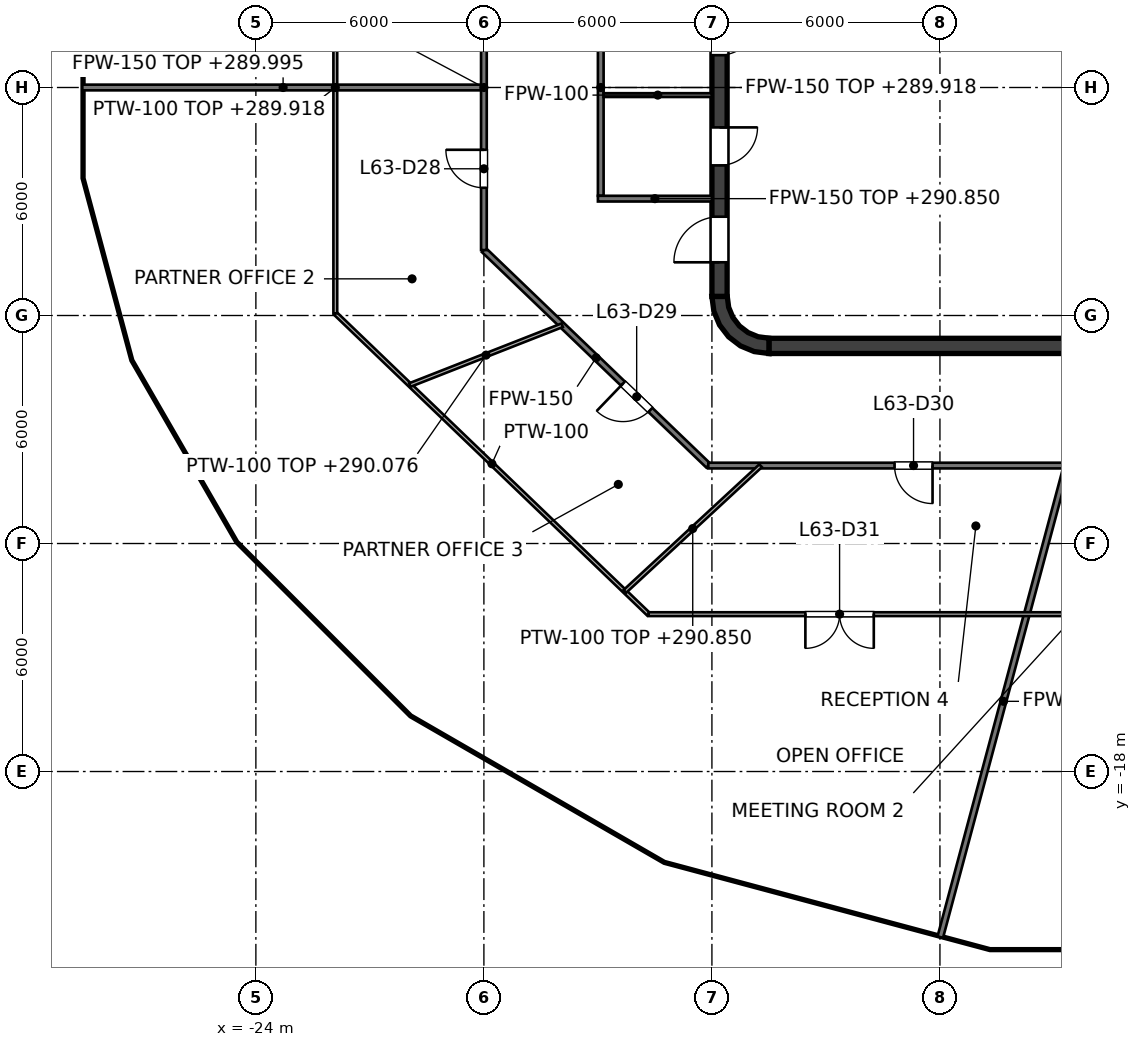
"""IFC4 building model, lengths in metres.
Left out: names, types, materials, properties, quantities, classifications, styles, units other than length and angle.
Written with IfcOpenShell. Run it as: python <this file> out.ifc"""

import sys

from ifc_helpers import new_model, si_unit, direction, frame, frame_2d, origin, place, context, subcontext, project, spatial, polyline, rectangle, outline, extrude, element, fill, save


model = new_model("IFC4")
c1 = context("Model", 3, precision=1e-05, world=origin(), true_north=direction((0.0, 1.0)))
c2 = subcontext(c1, "Body", "Model", "MODEL_VIEW")
j1 = project(units=[si_unit("LENGTHUNIT", "METRE"), si_unit("PLANEANGLEUNIT", "RADIAN")], contexts=[c1])
p1 = place(None, origin())
s1 = spatial("IfcSite", under=j1, at=p1, CompositionType="ELEMENT")
p2 = place(p1, origin())
s2 = spatial("IfcBuilding", under=s1, at=p2, CompositionType="ELEMENT")
p3 = place(p2, frame((0.0, 0.0, 287.0)))
s3 = spatial("IfcBuildingStorey", under=s2, at=p3, CompositionType="ELEMENT", Elevation=287.0)
p4 = place(p3, frame((-10.5, -6.8, 0.0), z_axis=(0.0, 0.0, 1.0), x_axis=(1.0, 0.0, 0.0)))
e1 = element("IfcWall", 1, at=p4, inside=s3, PredefinedType="SHEAR", context=c2, shape_type="SweptSolid", body=[
    extrude(rectangle(XDim=21.0, YDim=0.4, at=frame_2d((10.5, 0.0))), origin(), (0.0, 0.0, 1.0), 4.0),
])
p5 = place(p3, frame((-11.8, -5.5, 0.0), z_axis=(0.0, 0.0, 1.0), x_axis=(0.0, 1.0, 0.0)))
e2 = element("IfcWall", 2, at=p5, inside=s3, PredefinedType="SHEAR", context=c2, shape_type="SweptSolid", body=[
    extrude(rectangle(XDim=11.0, YDim=0.4, at=frame_2d((5.5, 0.0))), origin(), (0.0, 0.0, 1.0), 4.0),
])
p6 = place(p5, frame((3.45, 0.0, 0.0)))
e3 = element("IfcOpeningElement", 3, at=p6, cuts=e2, PredefinedType="OPENING", context=c2, shape_type="SweptSolid", body=[
    extrude(rectangle(XDim=1.0, YDim=2.1, at=frame_2d((0.5, 1.05))), frame((0.0, 0.2, 0.0), z_axis=(0.0, -1.0, 0.0), x_axis=(1.0, 0.0, 0.0)), (0.0, 0.0, 1.0), 0.4),
])
p7 = place(p5, frame((6.35, 0.0, 0.0)))
e4 = element("IfcOpeningElement", 4, at=p7, cuts=e2, PredefinedType="OPENING", context=c2, shape_type="SweptSolid", body=[
    extrude(rectangle(XDim=1.0, YDim=2.1, at=frame_2d((0.5, 1.05))), frame((0.0, 0.2, 0.0), z_axis=(0.0, -1.0, 0.0), x_axis=(1.0, 0.0, 0.0)), (0.0, 0.0, 1.0), 0.4),
])
p8 = place(p5, frame((0.9, 0.0, 0.0)))
e5 = element("IfcOpeningElement", 5, at=p8, cuts=e2, PredefinedType="OPENING", context=c2, shape_type="SweptSolid", body=[
    extrude(rectangle(XDim=1.2, YDim=2.1, at=frame_2d((0.6, 1.05))), frame((0.0, 0.2, 0.0), z_axis=(0.0, -1.0, 0.0), x_axis=(1.0, 0.0, 0.0)), (0.0, 0.0, 1.0), 0.4),
])
p9 = place(p5, frame((8.9, 0.0, 0.0)))
e6 = element("IfcOpeningElement", 6, at=p9, cuts=e2, PredefinedType="OPENING", context=c2, shape_type="SweptSolid", body=[
    extrude(rectangle(XDim=1.2, YDim=2.1, at=frame_2d((0.6, 1.05))), frame((0.0, 0.2, 0.0), z_axis=(0.0, -1.0, 0.0), x_axis=(1.0, 0.0, 0.0)), (0.0, 0.0, 1.0), 0.4),
])
p10 = place(p3, origin())
e7 = element("IfcWall", 7, at=p10, inside=s3, PredefinedType="SHEAR", context=c2, shape_type="SweptSolid", body=[
    extrude(outline(polyline([(-10.5, -7.0), (-10.5, -6.596), (-10.784, -6.559), (-11.048, -6.45), (-11.275, -6.275), (-11.45, -6.048), (-11.559, -5.784), (-11.596, -5.5), (-12.0, -5.5), (-11.949, -5.888), (-11.799, -6.25), (-11.561, -6.561), (-11.25, -6.799), (-10.888, -6.949), (-10.5, -7.0)])), origin(), (0.0, 0.0, 1.0), 4.0),
])
p11 = place(p3, frame((-9.0, -6.6, 0.0), z_axis=(0.0, 0.0, 1.0), x_axis=(0.0, 1.0, 0.0)))
e8 = element("IfcWall", 8, at=p11, inside=s3, PredefinedType="PARTITIONING", context=c2, shape_type="SweptSolid", body=[
    extrude(rectangle(XDim=2.5, YDim=0.25, at=frame_2d((1.25, 0.0))), origin(), (0.0, 0.0, 1.0), 3.85),
])
p12 = place(p11, frame((0.75, 0.0, 0.0)))
e9 = element("IfcOpeningElement", 9, at=p12, cuts=e8, PredefinedType="OPENING", context=c2, shape_type="SweptSolid", body=[
    extrude(rectangle(XDim=1.0, YDim=2.1, at=frame_2d((0.5, 1.05))), frame((0.0, 0.125, 0.0), z_axis=(0.0, -1.0, 0.0), x_axis=(1.0, 0.0, 0.0)), (0.0, 0.0, 1.0), 0.25),
])
p13 = place(p3, frame((-2.9, -6.6, 0.0), z_axis=(0.0, 0.0, 1.0), x_axis=(0.0, 1.0, 0.0)))
e10 = element("IfcWall", 10, at=p13, inside=s3, PredefinedType="PARTITIONING", context=c2, shape_type="SweptSolid", body=[
    extrude(rectangle(XDim=2.5, YDim=0.25, at=frame_2d((1.25, 0.0))), origin(), (0.0, 0.0, 1.0), 3.85),
])
p14 = place(p13, frame((0.8, 0.0, 0.0)))
e11 = element("IfcOpeningElement", 11, at=p14, cuts=e10, PredefinedType="OPENING", context=c2, shape_type="SweptSolid", body=[
    extrude(rectangle(XDim=0.9, YDim=2.1, at=frame_2d((0.45, 1.05))), frame((0.0, 0.125, 0.0), z_axis=(0.0, -1.0, 0.0), x_axis=(1.0, 0.0, 0.0)), (0.0, 0.0, 1.0), 0.25),
])
p15 = place(p3, frame((-9.125, -1.525, 0.0), z_axis=(0.0, 0.0, 1.0), x_axis=(1.0, 0.0, 0.0)))
e12 = element("IfcWall", 12, at=p15, inside=s3, PredefinedType="SOLIDWALL", context=c2, shape_type="SweptSolid", body=[
    extrude(rectangle(XDim=18.25, YDim=0.25, at=frame_2d((9.125, 0.0))), origin(), (0.0, 0.0, 1.0), 3.85),
])
p16 = place(p15, frame((7.15, 0.0, 0.0)))
e13 = element("IfcOpeningElement", 13, at=p16, cuts=e12, PredefinedType="OPENING", context=c2, shape_type="SweptSolid", body=[
    extrude(rectangle(XDim=1.2, YDim=2.1, at=frame_2d((0.6, 1.05))), frame((0.0, 0.125, 0.0), z_axis=(0.0, -1.0, 0.0), x_axis=(1.0, 0.0, 0.0)), (0.0, 0.0, 1.0), 0.25),
])
p17 = place(p15, frame((10.2, 0.0, 0.0)))
e14 = element("IfcOpeningElement", 14, at=p17, cuts=e12, PredefinedType="OPENING", context=c2, shape_type="SweptSolid", body=[
    extrude(rectangle(XDim=1.2, YDim=2.1, at=frame_2d((0.6, 1.05))), frame((0.0, 0.125, 0.0), z_axis=(0.0, -1.0, 0.0), x_axis=(1.0, 0.0, 0.0)), (0.0, 0.0, 1.0), 0.25),
])
p18 = place(p15, frame((16.075, 0.0, 0.0)))
e15 = element("IfcOpeningElement", 15, at=p18, cuts=e12, PredefinedType="OPENING", context=c2, shape_type="SweptSolid", body=[
    extrude(rectangle(XDim=1.0, YDim=2.1, at=frame_2d((0.5, 1.05))), frame((0.0, 0.125, 0.0), z_axis=(0.0, -1.0, 0.0), x_axis=(1.0, 0.0, 0.0)), (0.0, 0.0, 1.0), 0.25),
])
p19 = place(p3, frame((-9.125, -3.975, 0.0), z_axis=(0.0, 0.0, 1.0), x_axis=(1.0, 0.0, 0.0)))
e16 = element("IfcWall", 16, at=p19, inside=s3, PredefinedType="SOLIDWALL", context=c2, shape_type="SweptSolid", body=[
    extrude(rectangle(XDim=12.4, YDim=0.25, at=frame_2d((6.2, 0.0))), origin(), (0.0, 0.0, 1.0), 3.85),
])
p20 = place(p19, frame((1.05, 0.0, 0.0)))
e17 = element("IfcOpeningElement", 17, at=p20, cuts=e16, PredefinedType="OPENING", context=c2, shape_type="SweptSolid", body=[
    extrude(rectangle(XDim=1.2, YDim=2.1, at=frame_2d((0.6, 1.05))), frame((0.0, 0.125, 0.0), z_axis=(0.0, -1.0, 0.0), x_axis=(1.0, 0.0, 0.0)), (0.0, 0.0, 1.0), 0.25),
])
p21 = place(p19, frame((4.1, 0.0, 0.0)))
e18 = element("IfcOpeningElement", 18, at=p21, cuts=e16, PredefinedType="OPENING", context=c2, shape_type="SweptSolid", body=[
    extrude(rectangle(XDim=1.2, YDim=2.1, at=frame_2d((0.6, 1.05))), frame((0.0, 0.125, 0.0), z_axis=(0.0, -1.0, 0.0), x_axis=(1.0, 0.0, 0.0)), (0.0, 0.0, 1.0), 0.25),
])
for number, where, z_axis, x_axis in (
    (19, (-9.0, -3.85, 0.0), (0.0, 0.0, 1.0), (0.0, 1.0, 0.0)),
    (20, (-5.95, -3.85, 0.0), (0.0, 0.0, 1.0), (0.0, 1.0, 0.0)),
    (21, (-2.9, -3.85, 0.0), (0.0, 0.0, 1.0), (0.0, 1.0, 0.0)),
):
    element("IfcWall", number, at=place(p3, frame(where, z_axis=z_axis, x_axis=x_axis)), inside=s3, PredefinedType="SOLIDWALL", context=c2, shape_type="SweptSolid", body=[
        extrude(rectangle(XDim=2.2, YDim=0.25, at=frame_2d((1.1, 0.0))), origin(), (0.0, 0.0, 1.0), 3.85),
    ])
p22 = place(p3, frame((-14.925, -2.85, 0.0), z_axis=(0.0, 0.0, 1.0), x_axis=(0.0, 1.0, 0.0)))
e22 = element("IfcWall", 22, at=p22, inside=s3, PredefinedType="PARTITIONING", context=c2, shape_type="SweptSolid", body=[
    extrude(rectangle(XDim=5.7, YDim=0.15, at=frame_2d((2.85, 0.0))), origin(), (0.0, 0.0, 1.0), 2.918),
])
p23 = place(p3, frame((-15.0, -2.925, 0.0), z_axis=(0.0, 0.0, 1.0), x_axis=(1.0, 0.0, 0.0)))
e23 = element("IfcWall", 23, at=p23, inside=s3, PredefinedType="PARTITIONING", context=c2, shape_type="SweptSolid", body=[
    extrude(rectangle(XDim=3.0, YDim=0.15, at=frame_2d((1.5, 0.0))), origin(), (0.0, 0.0, 1.0), 3.85),
])
p24 = place(p3, frame((-14.85, -0.2, 0.0), z_axis=(0.0, 0.0, 1.0), x_axis=(1.0, 0.0, 0.0)))
e24 = element("IfcWall", 24, at=p24, inside=s3, PredefinedType="PARTITIONING", context=c2, shape_type="SweptSolid", body=[
    extrude(rectangle(XDim=2.85, YDim=0.1, at=frame_2d((1.425, 0.0))), origin(), (0.0, 0.0, 1.0), 3.85),
])
p25 = place(p3, frame((-18.0, -4.278, 0.0), z_axis=(0.0, 0.0, 1.0), x_axis=(0.721290181137, -0.692633001376, 0.0)))
e25 = element("IfcWall", 25, at=p25, inside=s3, PredefinedType="PARTITIONING", context=c2, shape_type="SweptSolid", body=[
    extrude(rectangle(XDim=8.187, YDim=0.15, at=frame_2d((4.094, 0.0))), origin(), (0.0, 0.0, 1.0), 2.927),
])
p26 = place(p25, frame((5.073, 0.0, 0.0)))
e26 = element("IfcOpeningElement", 26, at=p26, cuts=e25, PredefinedType="OPENING", context=c2, shape_type="SweptSolid", body=[
    extrude(rectangle(XDim=1.0, YDim=2.1, at=frame_2d((0.5, 1.05))), frame((0.0, 0.075, 0.0), z_axis=(0.0, -1.0, 0.0), x_axis=(1.0, 0.0, 0.0)), (0.0, 0.0, 1.0), 0.15),
])
p27 = place(p3, frame((-12.095, -9.949, 0.0), z_axis=(0.0, 0.0, 1.0), x_axis=(1.0, 0.0, 0.0)))
e27 = element("IfcWall", 27, at=p27, inside=s3, PredefinedType="PARTITIONING", context=c2, shape_type="SweptSolid", body=[
    extrude(rectangle(XDim=24.19, YDim=0.15, at=frame_2d((12.095, 0.0))), origin(), (0.0, 0.0, 1.0), 2.927),
])
p28 = place(p27, frame((22.617, 0.0, 0.0)))
e28 = element("IfcOpeningElement", 28, at=p28, cuts=e27, PredefinedType="OPENING", context=c2, shape_type="SweptSolid", body=[
    extrude(rectangle(XDim=1.0, YDim=2.1, at=frame_2d((0.5, 1.05))), frame((0.0, 0.075, 0.0), z_axis=(0.0, -1.0, 0.0), x_axis=(1.0, 0.0, 0.0)), (0.0, 0.0, 1.0), 0.15),
])
p29 = place(p27, frame((4.9, 0.0, 0.0)))
e29 = element("IfcOpeningElement", 29, at=p29, cuts=e27, PredefinedType="OPENING", context=c2, shape_type="SweptSolid", body=[
    extrude(rectangle(XDim=1.0, YDim=2.1, at=frame_2d((0.5, 1.05))), frame((0.0, 0.075, 0.0), z_axis=(0.0, -1.0, 0.0), x_axis=(1.0, 0.0, 0.0)), (0.0, 0.0, 1.0), 0.15),
])
p30 = place(p27, frame((11.05, 0.0, 0.0)))
e30 = element("IfcOpeningElement", 30, at=p30, cuts=e27, PredefinedType="OPENING", context=c2, shape_type="SweptSolid", body=[
    extrude(rectangle(XDim=1.0, YDim=2.1, at=frame_2d((0.5, 1.05))), frame((0.0, 0.075, 0.0), z_axis=(0.0, -1.0, 0.0), x_axis=(1.0, 0.0, 0.0)), (0.0, 0.0, 1.0), 0.15),
])
p31 = place(p27, frame((17.307, 0.0, 0.0)))
e31 = element("IfcOpeningElement", 31, at=p31, cuts=e27, PredefinedType="OPENING", context=c2, shape_type="SweptSolid", body=[
    extrude(rectangle(XDim=1.0, YDim=2.1, at=frame_2d((0.5, 1.05))), frame((0.0, 0.075, 0.0), z_axis=(0.0, -1.0, 0.0), x_axis=(1.0, 0.0, 0.0)), (0.0, 0.0, 1.0), 0.15),
])
p32 = place(p3, frame((-28.567, 0.0, 0.0), z_axis=(0.0, 0.0, 1.0), x_axis=(1.0, 0.0, 0.0)))
e32 = element("IfcWall", 32, at=p32, inside=s3, PredefinedType="PARTITIONING", context=c2, shape_type="SweptSolid", body=[
    extrude(rectangle(XDim=10.567, YDim=0.15, at=frame_2d((5.283, 0.0))), origin(), (0.0, 0.0, 1.0), 2.995),
])
p33 = place(p3, frame((-5.991, -22.357, 0.0), z_axis=(0.0, 0.0, 1.0), x_axis=(0.258854832266, 0.965916236437, 0.0)))
e33 = element("IfcWall", 33, at=p33, inside=s3, PredefinedType="PARTITIONING", context=c2, shape_type="SweptSolid", body=[
    extrude(rectangle(XDim=12.846, YDim=0.15, at=frame_2d((6.423, 0.0))), origin(), (0.0, 0.0, 1.0), 3.373),
])
p34 = place(p3, frame((-18.0, -4.278, 0.0), z_axis=(0.0, 0.0, 1.0), x_axis=(0.0, 1.0, 0.0)))
e34 = element("IfcWall", 34, at=p34, inside=s3, PredefinedType="PARTITIONING", context=c2, shape_type="SweptSolid", body=[
    extrude(rectangle(XDim=8.556, YDim=0.15, at=frame_2d((4.278, 0.0))), origin(), (0.0, 0.0, 1.0), 2.918),
])
p35 = place(p34, frame((1.639, 0.0, 0.0)))
e35 = element("IfcOpeningElement", 35, at=p35, cuts=e34, PredefinedType="OPENING", context=c2, shape_type="SweptSolid", body=[
    extrude(rectangle(XDim=1.0, YDim=2.1, at=frame_2d((0.5, 1.05))), frame((0.0, 0.075, 0.0), z_axis=(0.0, -1.0, 0.0), x_axis=(1.0, 0.0, 0.0)), (0.0, 0.0, 1.0), 0.15),
])
p36 = place(p3, frame((-21.91, -5.944, 0.0), z_axis=(0.0, 0.0, 1.0), x_axis=(0.721203280991, -0.69272348559, 0.0)))
e36 = element("IfcWall", 36, at=p36, inside=s3, PredefinedType="PARTITIONING", context=c2, shape_type="SweptSolid", body=[
    extrude(rectangle(XDim=11.427, YDim=0.1, at=frame_2d((5.713, 0.0))), origin(), (0.0, 0.0, 1.0), 2.927),
])
p37 = place(p3, frame((-13.668, -13.859, 0.0), z_axis=(0.0, 0.0, 1.0), x_axis=(1.0, 0.0, 0.0)))
e37 = element("IfcWall", 37, at=p37, inside=s3, PredefinedType="PARTITIONING", context=c2, shape_type="SweptSolid", body=[
    extrude(rectangle(XDim=27.336, YDim=0.1, at=frame_2d((13.668, 0.0))), origin(), (0.0, 0.0, 1.0), 2.927),
])
p38 = place(p37, frame((4.127, 0.0, 0.0)))
e38 = element("IfcOpeningElement", 38, at=p38, cuts=e37, PredefinedType="OPENING", context=c2, shape_type="SweptSolid", body=[
    extrude(rectangle(XDim=1.8, YDim=2.1, at=frame_2d((0.9, 1.05))), frame((0.0, 0.05, 0.0), z_axis=(0.0, -1.0, 0.0), x_axis=(1.0, 0.0, 0.0)), (0.0, 0.0, 1.0), 0.1),
])
p39 = place(p37, frame((20.699, 0.0, 0.0)))
e39 = element("IfcOpeningElement", 39, at=p39, cuts=e37, PredefinedType="OPENING", context=c2, shape_type="SweptSolid", body=[
    extrude(rectangle(XDim=1.8, YDim=2.1, at=frame_2d((0.9, 1.05))), frame((0.0, 0.05, 0.0), z_axis=(0.0, -1.0, 0.0), x_axis=(1.0, 0.0, 0.0)), (0.0, 0.0, 1.0), 0.1),
])
p40 = place(p3, frame((-19.947, -7.829, 0.0), z_axis=(0.0, 0.0, 1.0), x_axis=(0.930847279984, 0.36540845823, 0.0)))
e40 = element("IfcWall", 40, at=p40, inside=s3, PredefinedType="PARTITIONING", context=c2, shape_type="SweptSolid", body=[
    extrude(rectangle(XDim=4.305, YDim=0.1, at=frame_2d((2.152, 0.0))), origin(), (0.0, 0.0, 1.0), 3.076),
])
p41 = place(p3, frame((-14.291, -13.26, 0.0), z_axis=(0.0, 0.0, 1.0), x_axis=(0.733889385895, 0.679268996253, 0.0)))
e41 = element("IfcWall", 41, at=p41, inside=s3, PredefinedType="PARTITIONING", context=c2, shape_type="SweptSolid", body=[
    extrude(rectangle(XDim=4.868, YDim=0.1, at=frame_2d((2.434, 0.0))), origin(), (0.0, 0.0, 1.0), 3.85),
])
p42 = place(p3, frame((-21.91, -5.944, 0.0), z_axis=(0.0, 0.0, 1.0), x_axis=(0.0, 1.0, 0.0)))
e42 = element("IfcWall", 42, at=p42, inside=s3, PredefinedType="PARTITIONING", context=c2, shape_type="SweptSolid", body=[
    extrude(rectangle(XDim=11.888, YDim=0.1, at=frame_2d((5.944, 0.0))), origin(), (0.0, 0.0, 1.0), 2.918),
])
p43 = place(p20, origin())
e43 = element("IfcDoor", 43, at=p43, inside=s3, OperationType="DOUBLE_DOOR_SLIDING", PredefinedType="DOOR", context=c2, shape_type="SweptSolid", body=[
    extrude(rectangle(XDim=1.2, YDim=2.1, at=frame_2d((0.6, 1.05))), frame((0.0, 0.025, 0.0), z_axis=(0.0, -1.0, 0.0), x_axis=(1.0, 0.0, 0.0)), (0.0, 0.0, 1.0), 0.05),
])
fill(e17, e43)
p44 = place(p21, origin())
e44 = element("IfcDoor", 44, at=p44, inside=s3, OperationType="DOUBLE_DOOR_SLIDING", PredefinedType="DOOR", context=c2, shape_type="SweptSolid", body=[
    extrude(rectangle(XDim=1.2, YDim=2.1, at=frame_2d((0.6, 1.05))), frame((0.0, 0.025, 0.0), z_axis=(0.0, -1.0, 0.0), x_axis=(1.0, 0.0, 0.0)), (0.0, 0.0, 1.0), 0.05),
])
fill(e18, e44)
p45 = place(p12, origin())
e45 = element("IfcDoor", 45, at=p45, inside=s3, OperationType="SINGLE_SWING_LEFT", PredefinedType="DOOR", context=c2, shape_type="SweptSolid", body=[
    extrude(rectangle(XDim=1.0, YDim=2.1, at=frame_2d((0.5, 1.05))), frame((0.0, 0.025, 0.0), z_axis=(0.0, -1.0, 0.0), x_axis=(1.0, 0.0, 0.0)), (0.0, 0.0, 1.0), 0.05),
])
fill(e9, e45)
p46 = place(p14, origin())
e46 = element("IfcDoor", 46, at=p46, inside=s3, OperationType="SINGLE_SWING_RIGHT", PredefinedType="DOOR", context=c2, shape_type="SweptSolid", body=[
    extrude(rectangle(XDim=0.9, YDim=2.1, at=frame_2d((0.45, 1.05))), frame((0.0, 0.025, 0.0), z_axis=(0.0, -1.0, 0.0), x_axis=(1.0, 0.0, 0.0)), (0.0, 0.0, 1.0), 0.05),
])
fill(e11, e46)
p47 = place(p6, origin())
e47 = element("IfcDoor", 47, at=p47, inside=s3, OperationType="SINGLE_SWING_RIGHT", PredefinedType="DOOR", context=c2, shape_type="SweptSolid", body=[
    extrude(rectangle(XDim=1.0, YDim=2.1, at=frame_2d((0.5, 1.05))), frame((0.0, 0.025, 0.0), z_axis=(0.0, -1.0, 0.0), x_axis=(1.0, 0.0, 0.0)), (0.0, 0.0, 1.0), 0.05),
])
fill(e3, e47)
p48 = place(p7, origin())
e48 = element("IfcDoor", 48, at=p48, inside=s3, OperationType="SINGLE_SWING_RIGHT", PredefinedType="DOOR", context=c2, shape_type="SweptSolid", body=[
    extrude(rectangle(XDim=1.0, YDim=2.1, at=frame_2d((0.5, 1.05))), frame((0.0, 0.025, 0.0), z_axis=(0.0, -1.0, 0.0), x_axis=(1.0, 0.0, 0.0)), (0.0, 0.0, 1.0), 0.05),
])
fill(e4, e48)
p49 = place(p8, origin())
e49 = element("IfcDoor", 49, at=p49, inside=s3, OperationType="SINGLE_SWING_LEFT", PredefinedType="DOOR", context=c2, shape_type="SweptSolid", body=[
    extrude(rectangle(XDim=1.2, YDim=2.1, at=frame_2d((0.6, 1.05))), frame((0.0, 0.025, 0.0), z_axis=(0.0, -1.0, 0.0), x_axis=(1.0, 0.0, 0.0)), (0.0, 0.0, 1.0), 0.05),
])
fill(e5, e49)
p50 = place(p35, origin())
e50 = element("IfcDoor", 50, at=p50, inside=s3, OperationType="SINGLE_SWING_RIGHT", PredefinedType="DOOR", context=c2, shape_type="SweptSolid", body=[
    extrude(rectangle(XDim=1.0, YDim=2.1, at=frame_2d((0.5, 1.05))), frame((0.0, 0.025, 0.0), z_axis=(0.0, -1.0, 0.0), x_axis=(1.0, 0.0, 0.0)), (0.0, 0.0, 1.0), 0.05),
])
fill(e35, e50)
p51 = place(p26, origin())
e51 = element("IfcDoor", 51, at=p51, inside=s3, OperationType="SINGLE_SWING_LEFT", PredefinedType="DOOR", context=c2, shape_type="SweptSolid", body=[
    extrude(rectangle(XDim=1.0, YDim=2.1, at=frame_2d((0.5, 1.05))), frame((0.0, 0.025, 0.0), z_axis=(0.0, -1.0, 0.0), x_axis=(1.0, 0.0, 0.0)), (0.0, 0.0, 1.0), 0.05),
])
fill(e26, e51)
p52 = place(p29, origin())
e52 = element("IfcDoor", 52, at=p52, inside=s3, OperationType="SINGLE_SWING_RIGHT", PredefinedType="DOOR", context=c2, shape_type="SweptSolid", body=[
    extrude(rectangle(XDim=1.0, YDim=2.1, at=frame_2d((0.5, 1.05))), frame((0.0, 0.025, 0.0), z_axis=(0.0, -1.0, 0.0), x_axis=(1.0, 0.0, 0.0)), (0.0, 0.0, 1.0), 0.05),
])
fill(e29, e52)
p53 = place(p38, origin())
e53 = element("IfcDoor", 53, at=p53, inside=s3, OperationType="DOUBLE_DOOR_SINGLE_SWING", PredefinedType="DOOR", context=c2, shape_type="SweptSolid", body=[
    extrude(rectangle(XDim=1.8, YDim=2.1, at=frame_2d((0.9, 1.05))), frame((0.0, 0.025, 0.0), z_axis=(0.0, -1.0, 0.0), x_axis=(1.0, 0.0, 0.0)), (0.0, 0.0, 1.0), 0.05),
])
fill(e38, e53)
save(model, sys.argv[1])
